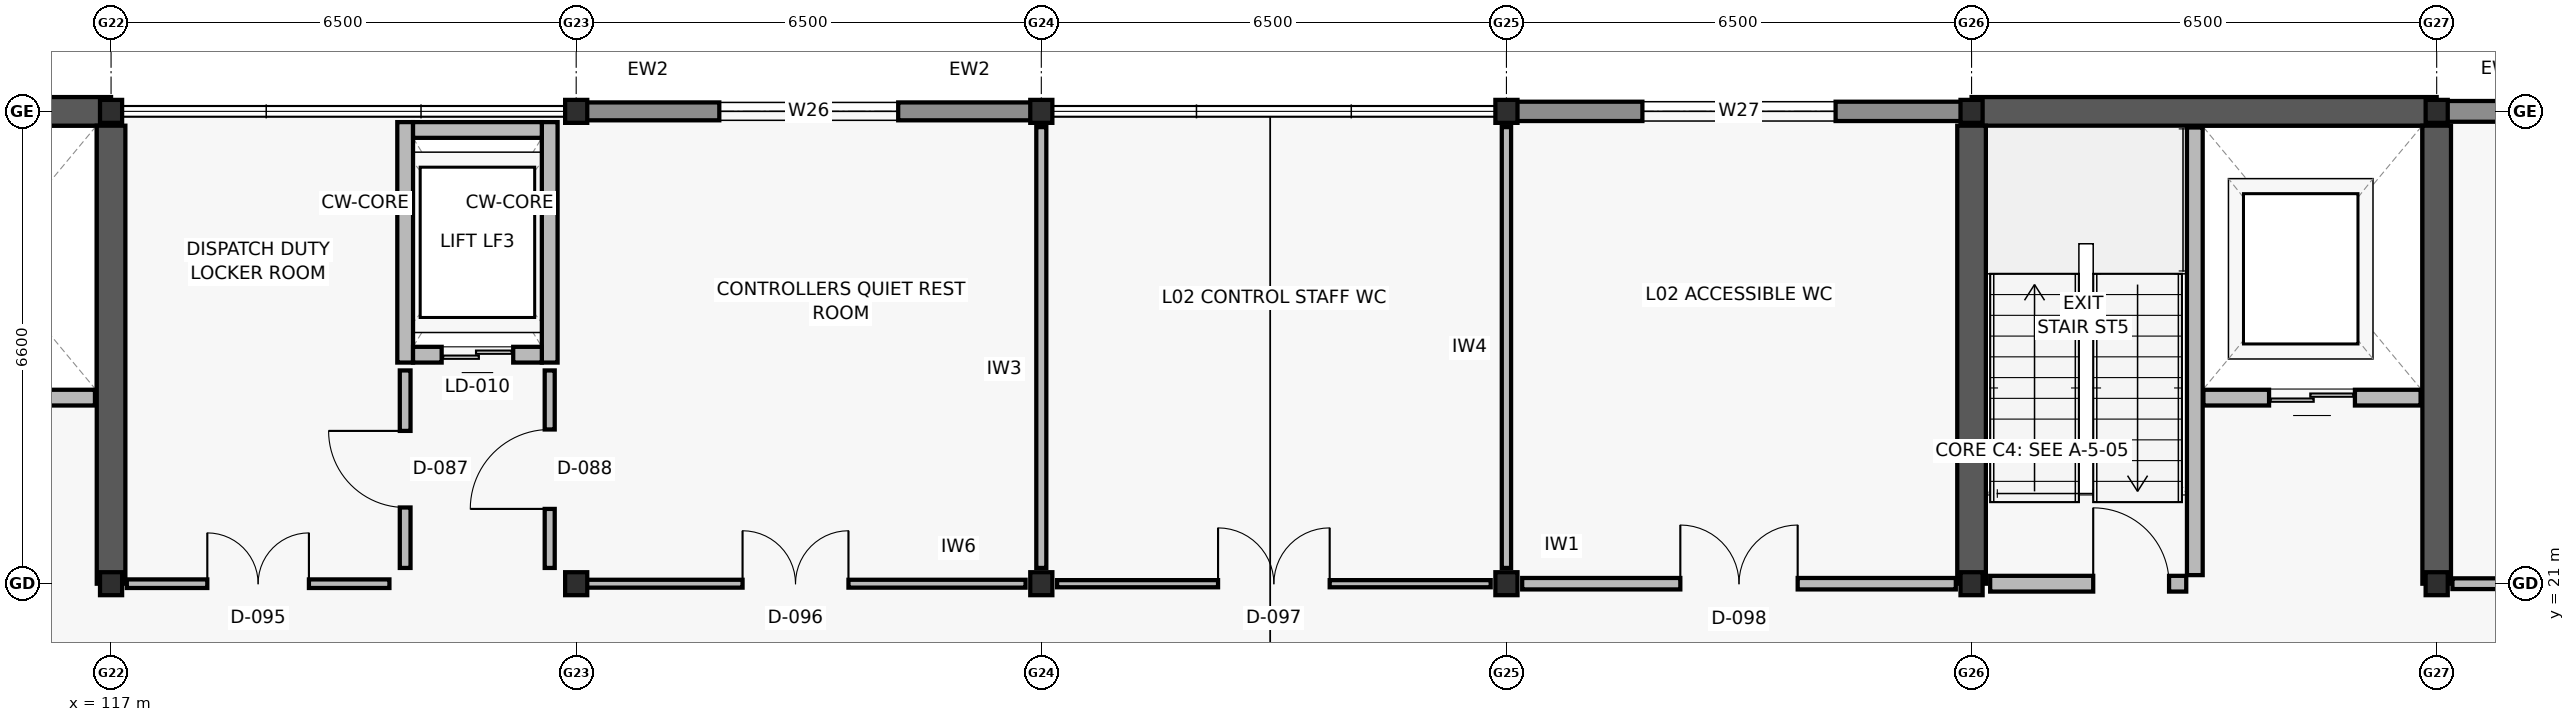
"""IFC4 building model, lengths in metres.
Left out: names, types, materials, properties, quantities, classifications, styles, units other than length and angle.
Written with IfcOpenShell. Run it as: python <this file> out.ifc"""

import sys

from ifc_helpers import new_model, si_unit, direction, frame, frame_2d, origin, origin_2d, place, context, subcontext, project, spatial, rectangle, i_section, extrude, element, fill, save


model = new_model("IFC4")
c1 = context("Model", 3, precision=1e-05, world=origin(), true_north=direction((0.0, 1.0)))
c2 = subcontext(c1, "Body", "Model", "MODEL_VIEW")
j1 = project(units=[si_unit("LENGTHUNIT", "METRE"), si_unit("PLANEANGLEUNIT", "RADIAN")], contexts=[c1])
p1 = place(None, origin())
s1 = spatial("IfcSite", under=j1, at=p1, CompositionType="ELEMENT")
p2 = place(p1, origin())
s2 = spatial("IfcBuilding", under=s1, at=p2, CompositionType="ELEMENT")
p3 = place(p2, frame((0.0, 0.0, 9.6)))
s3 = spatial("IfcBuildingStorey", under=s2, at=p3, CompositionType="ELEMENT", Elevation=9.6)
for number, where, z_axis, x_axis in (
    (1, (117.0, 21.0, 0.0), (0.0, 0.0, 1.0), (1.0, 0.0, 0.0)),
    (2, (117.0, 27.6, 0.0), (0.0, 0.0, 1.0), (1.0, 0.0, 0.0)),
    (3, (123.5, 21.0, 0.0), (0.0, 0.0, 1.0), (1.0, 0.0, 0.0)),
    (4, (123.5, 27.6, 0.0), (0.0, 0.0, 1.0), (1.0, 0.0, 0.0)),
    (5, (130.0, 21.0, 0.0), (0.0, 0.0, 1.0), (1.0, 0.0, 0.0)),
    (6, (130.0, 27.6, 0.0), (0.0, 0.0, 1.0), (1.0, 0.0, 0.0)),
    (7, (136.5, 21.0, 0.0), (0.0, 0.0, 1.0), (1.0, 0.0, 0.0)),
    (8, (136.5, 27.6, 0.0), (0.0, 0.0, 1.0), (1.0, 0.0, 0.0)),
    (9, (143.0, 21.0, 0.0), (0.0, 0.0, 1.0), (1.0, 0.0, 0.0)),
    (10, (143.0, 27.6, 0.0), (0.0, 0.0, 1.0), (1.0, 0.0, 0.0)),
    (11, (149.5, 21.0, 0.0), (0.0, 0.0, 1.0), (1.0, 0.0, 0.0)),
    (12, (149.5, 27.6, 0.0), (0.0, 0.0, 1.0), (1.0, 0.0, 0.0)),
):
    element("IfcColumn", number, at=place(p3, frame(where, z_axis=z_axis, x_axis=x_axis)), inside=s3, PredefinedType="COLUMN", context=c2, shape_type="SweptSolid", body=[
        extrude(i_section(OverallWidth=0.309, OverallDepth=0.321, WebThickness=0.014, FlangeThickness=0.022, FilletRadius=0.017, at=origin_2d()), origin(), (0.0, 0.0, 1.0), 3.9),
    ])
p4 = place(p3, frame((110.5, 27.6, 0.0), z_axis=(0.0, 0.0, 1.0), x_axis=(1.0, 0.0, 0.0)))
e13 = element("IfcWall", 13, at=p4, inside=s3, PredefinedType="SHEAR", context=c2, shape_type="SweptSolid", body=[
    extrude(rectangle(XDim=6.5, YDim=0.4, at=frame_2d((3.25, 0.0))), origin(), (0.0, 0.0, 1.0), 3.66),
])
p5 = place(p3, frame((117.0, 21.0, 0.0), z_axis=(0.0, 0.0, 1.0), x_axis=(0.0, 1.0, 0.0)))
e14 = element("IfcWall", 14, at=p5, inside=s3, PredefinedType="SHEAR", context=c2, shape_type="SweptSolid", body=[
    extrude(rectangle(XDim=6.4, YDim=0.4, at=frame_2d((3.2, 0.0))), origin(), (0.0, 0.0, 1.0), 3.66),
])
p6 = place(p3, frame((143.0, 27.6, 0.0), z_axis=(0.0, 0.0, 1.0), x_axis=(1.0, 0.0, 0.0)))
e15 = element("IfcWall", 15, at=p6, inside=s3, PredefinedType="SHEAR", context=c2, shape_type="SweptSolid", body=[
    extrude(rectangle(XDim=6.5, YDim=0.4, at=frame_2d((3.25, 0.0))), origin(), (0.0, 0.0, 1.0), 3.66),
])
for number, where, z_axis, x_axis in (
    (16, (143.0, 21.0, 0.0), (0.0, 0.0, 1.0), (0.0, 1.0, 0.0)),
    (17, (149.5, 21.0, 0.0), (0.0, 0.0, 1.0), (0.0, 1.0, 0.0)),
):
    element("IfcWall", number, at=place(p3, frame(where, z_axis=z_axis, x_axis=x_axis)), inside=s3, PredefinedType="SHEAR", context=c2, shape_type="SweptSolid", body=[
        extrude(rectangle(XDim=6.4, YDim=0.4, at=frame_2d((3.2, 0.0))), origin(), (0.0, 0.0, 1.0), 3.66),
    ])
p7 = place(p3, frame((123.505, 27.6, 0.0), z_axis=(0.0, 0.0, 1.0), x_axis=(1.0, 0.0, 0.0)))
e18 = element("IfcWall", 18, at=p7, inside=s3, PredefinedType="SOLIDWALL", context=c2, shape_type="SweptSolid", body=[
    extrude(rectangle(XDim=6.49, YDim=0.25, at=frame_2d((3.245, 0.0))), origin(), (0.0, 0.0, 1.0), 3.02),
])
p8 = place(p7, frame((1.995, 0.0, 0.8)))
e19 = element("IfcOpeningElement", 19, at=p8, cuts=e18, PredefinedType="OPENING", context=c2, shape_type="SweptSolid", body=[
    extrude(rectangle(XDim=2.5, YDim=1.15, at=frame_2d((1.25, 0.575))), frame((0.0, 0.135, 0.0), z_axis=(0.0, -1.0, 0.0), x_axis=(1.0, 0.0, 0.0)), (0.0, 0.0, 1.0), 0.27),
])
p9 = place(p3, frame((136.505, 27.6, 0.0), z_axis=(0.0, 0.0, 1.0), x_axis=(1.0, 0.0, 0.0)))
e20 = element("IfcWall", 20, at=p9, inside=s3, PredefinedType="SOLIDWALL", context=c2, shape_type="SweptSolid", body=[
    extrude(rectangle(XDim=6.49, YDim=0.27, at=frame_2d((3.245, 0.0))), origin(), (0.0, 0.0, 1.0), 3.02),
])
p10 = place(p9, frame((1.895, 0.0, 0.8)))
e21 = element("IfcOpeningElement", 21, at=p10, cuts=e20, PredefinedType="OPENING", context=c2, shape_type="SweptSolid", body=[
    extrude(rectangle(XDim=2.7, YDim=1.15, at=frame_2d((1.35, 0.575))), frame((0.0, 0.145, 0.0), z_axis=(0.0, -1.0, 0.0), x_axis=(1.0, 0.0, 0.0)), (0.0, 0.0, 1.0), 0.29),
])
p11 = place(p3, frame((149.505, 27.6, 0.0), z_axis=(0.0, 0.0, 1.0), x_axis=(1.0, 0.0, 0.0)))
e22 = element("IfcWall", 22, at=p11, inside=s3, PredefinedType="SOLIDWALL", context=c2, shape_type="SweptSolid", body=[
    extrude(rectangle(XDim=6.49, YDim=0.29, at=frame_2d((3.245, 0.0))), origin(), (0.0, 0.0, 1.0), 3.02),
])
p12 = place(p11, frame((1.795, 0.0, 0.8)))
e23 = element("IfcOpeningElement", 23, at=p12, cuts=e22, PredefinedType="OPENING", context=c2, shape_type="SweptSolid", body=[
    extrude(rectangle(XDim=2.9, YDim=1.15, at=frame_2d((1.45, 0.575))), frame((0.0, 0.155, 0.0), z_axis=(0.0, -1.0, 0.0), x_axis=(1.0, 0.0, 0.0)), (0.0, 0.0, 1.0), 0.31),
])
p13 = place(p3, frame((113.74, 23.6, 0.0), z_axis=(0.0, 0.0, 1.0), x_axis=(1.0, 0.0, 0.0)))
e24 = element("IfcWall", 24, at=p13, inside=s3, PredefinedType="SOLIDWALL", context=c2, shape_type="SweptSolid", body=[
    extrude(rectangle(XDim=3.035, YDim=0.22, at=frame_2d((1.518, 0.0))), origin(), (0.0, 0.0, 1.0), 3.66),
])
p14 = place(p13, frame((0.968, 0.0, 0.0)))
e25 = element("IfcOpeningElement", 25, at=p14, cuts=e24, PredefinedType="OPENING", context=c2, shape_type="SweptSolid", body=[
    extrude(rectangle(XDim=1.1, YDim=2.1, at=frame_2d((0.55, 1.05))), frame((0.0, 0.12, 0.0), z_axis=(0.0, -1.0, 0.0), x_axis=(1.0, 0.0, 0.0)), (0.0, 0.0, 1.0), 0.24),
])
for number, where, z_axis, x_axis in (
    (26, (121.11, 24.09, 0.0), (0.0, 0.0, 1.0), (0.0, 1.0, 0.0)),
    (27, (123.13, 24.09, 0.0), (0.0, 0.0, 1.0), (0.0, 1.0, 0.0)),
):
    element("IfcWall", number, at=place(p3, frame(where, z_axis=z_axis, x_axis=x_axis)), inside=s3, PredefinedType="SOLIDWALL", context=c2, shape_type="SweptSolid", body=[
        extrude(rectangle(XDim=3.36, YDim=0.22, at=frame_2d((1.68, 0.0))), origin(), (0.0, 0.0, 1.0), 3.66),
    ])
p15 = place(p3, frame((121.22, 27.34, 0.0), z_axis=(0.0, 0.0, 1.0), x_axis=(1.0, 0.0, 0.0)))
e28 = element("IfcWall", 28, at=p15, inside=s3, PredefinedType="SOLIDWALL", context=c2, shape_type="SweptSolid", body=[
    extrude(rectangle(XDim=1.8, YDim=0.22, at=frame_2d((0.9, 0.0))), origin(), (0.0, 0.0, 1.0), 3.66),
])
p16 = place(p3, frame((121.22, 24.2, 0.0), z_axis=(0.0, 0.0, 1.0), x_axis=(1.0, 0.0, 0.0)))
e29 = element("IfcWall", 29, at=p16, inside=s3, PredefinedType="SOLIDWALL", context=c2, shape_type="SweptSolid", body=[
    extrude(rectangle(XDim=1.8, YDim=0.22, at=frame_2d((0.9, 0.0))), origin(), (0.0, 0.0, 1.0), 3.66),
])
p17 = place(p16, frame((0.4, 0.0, 0.0)))
e30 = element("IfcOpeningElement", 30, at=p17, cuts=e29, PredefinedType="OPENING", context=c2, shape_type="SweptSolid", body=[
    extrude(rectangle(XDim=1.0, YDim=2.1, at=frame_2d((0.5, 1.05))), frame((0.0, 0.12, 0.0), z_axis=(0.0, -1.0, 0.0), x_axis=(1.0, 0.0, 0.0)), (0.0, 0.0, 1.0), 0.24),
])
p18 = place(p3, frame((146.12, 21.12, 0.0), z_axis=(0.0, 0.0, 1.0), x_axis=(0.0, 1.0, 0.0)))
e31 = element("IfcWall", 31, at=p18, inside=s3, PredefinedType="SOLIDWALL", context=c2, shape_type="SweptSolid", body=[
    extrude(rectangle(XDim=6.255, YDim=0.22, at=frame_2d((3.127, 0.0))), origin(), (0.0, 0.0, 1.0), 3.66),
])
p19 = place(p3, frame((143.26, 21.0, 0.0), z_axis=(0.0, 0.0, 1.0), x_axis=(1.0, 0.0, 0.0)))
e32 = element("IfcWall", 32, at=p19, inside=s3, PredefinedType="SOLIDWALL", context=c2, shape_type="SweptSolid", body=[
    extrude(rectangle(XDim=2.74, YDim=0.22, at=frame_2d((1.37, 0.0))), origin(), (0.0, 0.0, 1.0), 3.02),
])
p20 = place(p19, frame((1.44, 0.0, 0.0)))
e33 = element("IfcOpeningElement", 33, at=p20, cuts=e32, PredefinedType="OPENING", context=c2, shape_type="SweptSolid", body=[
    extrude(rectangle(XDim=1.06, YDim=2.1, at=frame_2d((0.53, 1.05))), frame((0.0, 0.12, 0.0), z_axis=(0.0, -1.0, 0.0), x_axis=(1.0, 0.0, 0.0)), (0.0, 0.0, 1.0), 0.24),
])
p21 = place(p3, frame((146.24, 23.6, 0.0), z_axis=(0.0, 0.0, 1.0), x_axis=(1.0, 0.0, 0.0)))
e34 = element("IfcWall", 34, at=p21, inside=s3, PredefinedType="SOLIDWALL", context=c2, shape_type="SweptSolid", body=[
    extrude(rectangle(XDim=3.035, YDim=0.22, at=frame_2d((1.518, 0.0))), origin(), (0.0, 0.0, 1.0), 3.66),
])
p22 = place(p21, frame((0.917, 0.0, 0.0)))
e35 = element("IfcOpeningElement", 35, at=p22, cuts=e34, PredefinedType="OPENING", context=c2, shape_type="SweptSolid", body=[
    extrude(rectangle(XDim=1.2, YDim=2.15, at=frame_2d((0.6, 1.075))), frame((0.0, 0.12, 0.0), z_axis=(0.0, -1.0, 0.0), x_axis=(1.0, 0.0, 0.0)), (0.0, 0.0, 1.0), 0.24),
])
p23 = place(p3, frame((121.11, 21.22, 0.0), z_axis=(0.0, 0.0, 1.0), x_axis=(0.0, 1.0, 0.0)))
e36 = element("IfcWall", 36, at=p23, inside=s3, PredefinedType="PARTITIONING", context=c2, shape_type="SweptSolid", body=[
    extrude(rectangle(XDim=2.76, YDim=0.15, at=frame_2d((1.38, 0.0))), origin(), (0.0, 0.0, 1.0), 3.0),
])
p24 = place(p23, frame((0.845, 0.0, 0.0)))
e37 = element("IfcOpeningElement", 37, at=p24, cuts=e36, PredefinedType="OPENING", context=c2, shape_type="SweptSolid", body=[
    extrude(rectangle(XDim=1.07, YDim=2.08, at=frame_2d((0.535, 1.04))), frame((0.0, 0.085, 0.0), z_axis=(0.0, -1.0, 0.0), x_axis=(1.0, 0.0, 0.0)), (0.0, 0.0, 1.0), 0.17),
])
p25 = place(p3, frame((123.13, 21.22, 0.0), z_axis=(0.0, 0.0, 1.0), x_axis=(0.0, 1.0, 0.0)))
e38 = element("IfcWall", 38, at=p25, inside=s3, PredefinedType="PARTITIONING", context=c2, shape_type="SweptSolid", body=[
    extrude(rectangle(XDim=2.76, YDim=0.14, at=frame_2d((1.38, 0.0))), origin(), (0.0, 0.0, 1.0), 3.0),
])
p26 = place(p25, frame((0.825, 0.0, 0.0)))
e39 = element("IfcOpeningElement", 39, at=p26, cuts=e38, PredefinedType="OPENING", context=c2, shape_type="SweptSolid", body=[
    extrude(rectangle(XDim=1.11, YDim=2.1, at=frame_2d((0.555, 1.05))), frame((0.0, 0.08, 0.0), z_axis=(0.0, -1.0, 0.0), x_axis=(1.0, 0.0, 0.0)), (0.0, 0.0, 1.0), 0.16),
])
p27 = place(p3, frame((117.22, 21.0, 0.0), z_axis=(0.0, 0.0, 1.0), x_axis=(1.0, 0.0, 0.0)))
e40 = element("IfcWall", 40, at=p27, inside=s3, PredefinedType="PARTITIONING", context=c2, shape_type="SweptSolid", body=[
    extrude(rectangle(XDim=3.67, YDim=0.12, at=frame_2d((1.835, 0.0))), origin(), (0.0, 0.0, 1.0), 3.0),
])
p28 = place(p27, frame((1.125, 0.0, 0.0)))
e41 = element("IfcOpeningElement", 41, at=p28, cuts=e40, PredefinedType="OPENING", context=c2, shape_type="SweptSolid", body=[
    extrude(rectangle(XDim=1.42, YDim=2.15, at=frame_2d((0.71, 1.075))), frame((0.0, 0.07, 0.0), z_axis=(0.0, -1.0, 0.0), x_axis=(1.0, 0.0, 0.0)), (0.0, 0.0, 1.0), 0.14),
])
p29 = place(p3, frame((123.35, 21.0, 0.0), z_axis=(0.0, 0.0, 1.0), x_axis=(1.0, 0.0, 0.0)))
e42 = element("IfcWall", 42, at=p29, inside=s3, PredefinedType="PARTITIONING", context=c2, shape_type="SweptSolid", body=[
    extrude(rectangle(XDim=6.43, YDim=0.11, at=frame_2d((3.215, 0.0))), origin(), (0.0, 0.0, 1.0), 3.0),
])
p30 = place(p29, frame((2.475, 0.0, 0.0)))
e43 = element("IfcOpeningElement", 43, at=p30, cuts=e42, PredefinedType="OPENING", context=c2, shape_type="SweptSolid", body=[
    extrude(rectangle(XDim=1.48, YDim=2.18, at=frame_2d((0.74, 1.09))), frame((0.0, 0.065, 0.0), z_axis=(0.0, -1.0, 0.0), x_axis=(1.0, 0.0, 0.0)), (0.0, 0.0, 1.0), 0.13),
])
p31 = place(p3, frame((130.22, 21.0, 0.0), z_axis=(0.0, 0.0, 1.0), x_axis=(1.0, 0.0, 0.0)))
e44 = element("IfcWall", 44, at=p31, inside=s3, PredefinedType="PARTITIONING", context=c2, shape_type="SweptSolid", body=[
    extrude(rectangle(XDim=6.06, YDim=0.1, at=frame_2d((3.03, 0.0))), origin(), (0.0, 0.0, 1.0), 3.0),
])
p32 = place(p31, frame((2.25, 0.0, 0.0)))
e45 = element("IfcOpeningElement", 45, at=p32, cuts=e44, PredefinedType="OPENING", context=c2, shape_type="SweptSolid", body=[
    extrude(rectangle(XDim=1.56, YDim=2.18, at=frame_2d((0.78, 1.09))), frame((0.0, 0.06, 0.0), z_axis=(0.0, -1.0, 0.0), x_axis=(1.0, 0.0, 0.0)), (0.0, 0.0, 1.0), 0.12),
])
p33 = place(p3, frame((136.72, 21.0, 0.0), z_axis=(0.0, 0.0, 1.0), x_axis=(1.0, 0.0, 0.0)))
e46 = element("IfcWall", 46, at=p33, inside=s3, PredefinedType="PARTITIONING", context=c2, shape_type="SweptSolid", body=[
    extrude(rectangle(XDim=6.06, YDim=0.16, at=frame_2d((3.03, 0.0))), origin(), (0.0, 0.0, 1.0), 3.0),
])
p34 = place(p33, frame((2.21, 0.0, 0.0)))
e47 = element("IfcOpeningElement", 47, at=p34, cuts=e46, PredefinedType="OPENING", context=c2, shape_type="SweptSolid", body=[
    extrude(rectangle(XDim=1.64, YDim=2.2, at=frame_2d((0.82, 1.1))), frame((0.0, 0.09, 0.0), z_axis=(0.0, -1.0, 0.0), x_axis=(1.0, 0.0, 0.0)), (0.0, 0.0, 1.0), 0.18),
])
p35 = place(p3, frame((149.72, 21.0, 0.0), z_axis=(0.0, 0.0, 1.0), x_axis=(1.0, 0.0, 0.0)))
e48 = element("IfcWall", 48, at=p35, inside=s3, PredefinedType="PARTITIONING", context=c2, shape_type="SweptSolid", body=[
    extrude(rectangle(XDim=12.46, YDim=0.15, at=frame_2d((6.23, 0.0))), origin(), (0.0, 0.0, 1.0), 3.0),
])
p36 = place(p35, frame((6.61, 0.0, 0.0)))
e49 = element("IfcOpeningElement", 49, at=p36, cuts=e48, PredefinedType="OPENING", context=c2, shape_type="SweptSolid", body=[
    extrude(rectangle(XDim=1.74, YDim=2.2, at=frame_2d((0.87, 1.1))), frame((0.0, 0.085, 0.0), z_axis=(0.0, -1.0, 0.0), x_axis=(1.0, 0.0, 0.0)), (0.0, 0.0, 1.0), 0.17),
])
p37 = place(p3, frame((130.0, 21.22, 0.0), z_axis=(0.0, 0.0, 1.0), x_axis=(0.0, 1.0, 0.0)))
e50 = element("IfcWall", 50, at=p37, inside=s3, PredefinedType="PARTITIONING", context=c2, shape_type="SweptSolid", body=[
    extrude(rectangle(XDim=6.16, YDim=0.14, at=frame_2d((3.08, 0.0))), origin(), (0.0, 0.0, 1.0), 3.0),
])
p38 = place(p3, frame((136.5, 21.22, 0.0), z_axis=(0.0, 0.0, 1.0), x_axis=(0.0, 1.0, 0.0)))
e51 = element("IfcWall", 51, at=p38, inside=s3, PredefinedType="PARTITIONING", context=c2, shape_type="SweptSolid", body=[
    extrude(rectangle(XDim=6.16, YDim=0.13, at=frame_2d((3.08, 0.0))), origin(), (0.0, 0.0, 1.0), 3.0),
])
p39 = place(p8, origin())
e52 = element("IfcWindow", 52, at=p39, inside=s3, PartitioningType="TRIPLE_PANEL_VERTICAL", PredefinedType="WINDOW", context=c2, shape_type="SweptSolid", body=[
    extrude(rectangle(XDim=2.5, YDim=1.15, at=frame_2d((1.25, 0.575))), frame((0.0, 0.03, 0.0), z_axis=(0.0, -1.0, 0.0), x_axis=(1.0, 0.0, 0.0)), (0.0, 0.0, 1.0), 0.06),
])
fill(e19, e52)
p40 = place(p10, origin())
e53 = element("IfcWindow", 53, at=p40, inside=s3, PartitioningType="TRIPLE_PANEL_VERTICAL", PredefinedType="WINDOW", context=c2, shape_type="SweptSolid", body=[
    extrude(rectangle(XDim=2.7, YDim=1.15, at=frame_2d((1.35, 0.575))), frame((0.0, 0.03, 0.0), z_axis=(0.0, -1.0, 0.0), x_axis=(1.0, 0.0, 0.0)), (0.0, 0.0, 1.0), 0.06),
])
fill(e21, e53)
p41 = place(p17, origin())
e54 = element("IfcDoor", 54, at=p41, inside=s3, OperationType="DOUBLE_DOOR_SLIDING", PredefinedType="DOOR", context=c2, shape_type="SweptSolid", body=[
    extrude(rectangle(XDim=1.0, YDim=2.1, at=frame_2d((0.5, 1.05))), frame((0.0, 0.025, 0.0), z_axis=(0.0, -1.0, 0.0), x_axis=(1.0, 0.0, 0.0)), (0.0, 0.0, 1.0), 0.05),
])
fill(e30, e54)
p42 = place(p20, origin())
e55 = element("IfcDoor", 55, at=p42, inside=s3, OperationType="SINGLE_SWING_LEFT", PredefinedType="DOOR", context=c2, shape_type="SweptSolid", body=[
    extrude(rectangle(XDim=1.06, YDim=2.1, at=frame_2d((0.53, 1.05))), frame((0.0, 0.025, 0.0), z_axis=(0.0, -1.0, 0.0), x_axis=(1.0, 0.0, 0.0)), (0.0, 0.0, 1.0), 0.05),
])
fill(e33, e55)
p43 = place(p22, origin())
e56 = element("IfcDoor", 56, at=p43, inside=s3, OperationType="DOUBLE_DOOR_SLIDING", PredefinedType="DOOR", context=c2, shape_type="SweptSolid", body=[
    extrude(rectangle(XDim=1.2, YDim=2.15, at=frame_2d((0.6, 1.075))), frame((0.0, 0.025, 0.0), z_axis=(0.0, -1.0, 0.0), x_axis=(1.0, 0.0, 0.0)), (0.0, 0.0, 1.0), 0.05),
])
fill(e35, e56)
p44 = place(p24, origin())
e57 = element("IfcDoor", 57, at=p44, inside=s3, OperationType="SINGLE_SWING_RIGHT", PredefinedType="DOOR", context=c2, shape_type="SweptSolid", body=[
    extrude(rectangle(XDim=1.07, YDim=2.08, at=frame_2d((0.535, 1.04))), frame((0.0, 0.025, 0.0), z_axis=(0.0, -1.0, 0.0), x_axis=(1.0, 0.0, 0.0)), (0.0, 0.0, 1.0), 0.05),
])
fill(e37, e57)
p45 = place(p26, origin())
e58 = element("IfcDoor", 58, at=p45, inside=s3, OperationType="SINGLE_SWING_LEFT", PredefinedType="DOOR", context=c2, shape_type="SweptSolid", body=[
    extrude(rectangle(XDim=1.11, YDim=2.1, at=frame_2d((0.555, 1.05))), frame((0.0, 0.025, 0.0), z_axis=(0.0, -1.0, 0.0), x_axis=(1.0, 0.0, 0.0)), (0.0, 0.0, 1.0), 0.05),
])
fill(e39, e58)
p46 = place(p28, origin())
e59 = element("IfcDoor", 59, at=p46, inside=s3, OperationType="DOUBLE_DOOR_SINGLE_SWING", PredefinedType="DOOR", context=c2, shape_type="SweptSolid", body=[
    extrude(rectangle(XDim=1.42, YDim=2.15, at=frame_2d((0.71, 1.075))), frame((0.0, 0.025, 0.0), z_axis=(0.0, -1.0, 0.0), x_axis=(1.0, 0.0, 0.0)), (0.0, 0.0, 1.0), 0.05),
])
fill(e41, e59)
p47 = place(p30, origin())
e60 = element("IfcDoor", 60, at=p47, inside=s3, OperationType="DOUBLE_DOOR_SINGLE_SWING", PredefinedType="DOOR", context=c2, shape_type="SweptSolid", body=[
    extrude(rectangle(XDim=1.48, YDim=2.18, at=frame_2d((0.74, 1.09))), frame((0.0, 0.025, 0.0), z_axis=(0.0, -1.0, 0.0), x_axis=(1.0, 0.0, 0.0)), (0.0, 0.0, 1.0), 0.05),
])
fill(e43, e60)
p48 = place(p32, origin())
e61 = element("IfcDoor", 61, at=p48, inside=s3, OperationType="DOUBLE_DOOR_SINGLE_SWING", PredefinedType="DOOR", context=c2, shape_type="SweptSolid", body=[
    extrude(rectangle(XDim=1.56, YDim=2.18, at=frame_2d((0.78, 1.09))), frame((0.0, 0.025, 0.0), z_axis=(0.0, -1.0, 0.0), x_axis=(1.0, 0.0, 0.0)), (0.0, 0.0, 1.0), 0.05),
])
fill(e45, e61)
p49 = place(p34, origin())
e62 = element("IfcDoor", 62, at=p49, inside=s3, OperationType="DOUBLE_DOOR_SINGLE_SWING", PredefinedType="DOOR", context=c2, shape_type="SweptSolid", body=[
    extrude(rectangle(XDim=1.64, YDim=2.2, at=frame_2d((0.82, 1.1))), frame((0.0, 0.025, 0.0), z_axis=(0.0, -1.0, 0.0), x_axis=(1.0, 0.0, 0.0)), (0.0, 0.0, 1.0), 0.05),
])
fill(e47, e62)
save(model, sys.argv[1])
